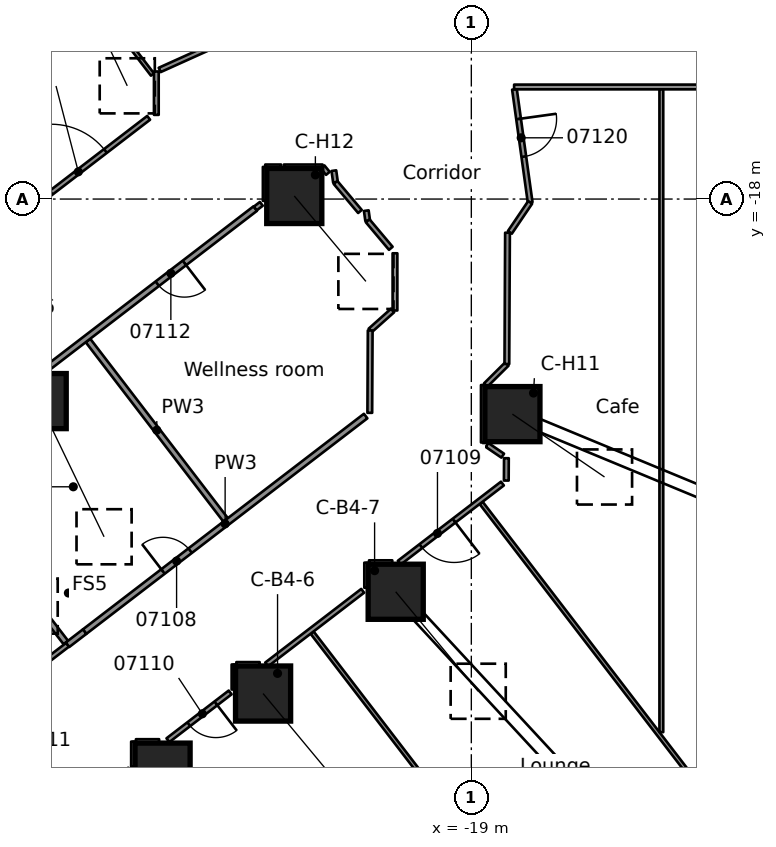
"""IFC4 building model, lengths in metres.
Left out: names, types, materials, properties, quantities, classifications, styles, units other than length and angle.
Written with IfcOpenShell. Run it as: python <this file> out.ifc"""

import sys

from ifc_helpers import new_model, si_unit, direction, frame, frame_2d, origin, origin_2d, place, context, subcontext, project, spatial, rectangle, extrude, element, fill, save


model = new_model("IFC4")
c1 = context("Model", 3, precision=1e-05, world=origin(), true_north=direction((0.0, 1.0)))
c2 = subcontext(c1, "Body", "Model", "MODEL_VIEW")
j1 = project(units=[si_unit("LENGTHUNIT", "METRE"), si_unit("PLANEANGLEUNIT", "RADIAN")], contexts=[c1])
p1 = place(None, origin())
s1 = spatial("IfcSite", under=j1, at=p1, CompositionType="ELEMENT")
p2 = place(p1, origin())
s2 = spatial("IfcBuilding", under=s1, at=p2, CompositionType="ELEMENT")
p3 = place(p2, frame((0.0, 0.0, 33.3)))
s3 = spatial("IfcBuildingStorey", under=s2, at=p3, CompositionType="ELEMENT", Elevation=33.3)
p4 = place(p3, frame((-33.03, -25.345, 0.601), z_axis=(0.484075605361, -0.672785526742, 0.559491236125), x_axis=(0.811723079597, 0.584042500208, 0.0)))
e1 = element("IfcColumn", 1, at=p4, inside=s3, PredefinedType="COLUMN", context=c2, shape_type="SweptSolid", body=[
    extrude(rectangle(XDim=1.45, YDim=1.45, at=origin_2d()), origin(), (0.0, 0.0, 1.0), 5.001),
])
p5 = place(p3, frame((-30.385, -23.316, 0.591), z_axis=(0.353875242444, -0.734106635021, 0.579534089768), x_axis=(0.90080181457, 0.434230458244, 0.0)))
e2 = element("IfcColumn", 2, at=p5, inside=s3, PredefinedType="COLUMN", context=c2, shape_type="SweptSolid", body=[
    extrude(rectangle(XDim=1.45, YDim=1.45, at=origin_2d()), origin(), (0.0, 0.0, 1.0), 4.863),
])
p6 = place(p3, frame((-27.125, -33.04, 0.603), z_axis=(0.626915434331, -0.545922874152, 0.555828439066), x_axis=(0.656712169931, 0.754141316906, 0.0)))
e3 = element("IfcColumn", 3, at=p6, inside=s3, PredefinedType="COLUMN", context=c2, shape_type="SweptSolid", body=[
    extrude(rectangle(XDim=1.45, YDim=1.45, at=origin_2d()), origin(), (0.0, 0.0, 1.0), 5.028),
])
p7 = place(p3, frame((-24.48, -31.011, 0.583), z_axis=(0.514125147633, -0.618557618127, 0.594190041678), x_axis=(0.769039707257, 0.639201008026, 0.0)))
e4 = element("IfcColumn", 4, at=p7, inside=s3, PredefinedType="COLUMN", context=c2, shape_type="SweptSolid", body=[
    extrude(rectangle(XDim=1.45, YDim=1.45, at=origin_2d()), origin(), (0.0, 0.0, 1.0), 4.769),
])
p8 = place(p3, frame((-20.99, -28.333, 0.552), z_axis=(0.48599783766, -0.586072291187, 0.648325050644), x_axis=(0.769766563569, 0.638325495035, 0.0)))
e5 = element("IfcColumn", 5, at=p8, inside=s3, PredefinedType="COLUMN", context=c2, shape_type="SweptSolid", body=[
    extrude(rectangle(XDim=1.45, YDim=1.45, at=origin_2d()), origin(), (0.0, 0.0, 1.0), 4.467),
])
p9 = place(p3, frame((-17.919, -23.659, 0.508), z_axis=(0.579239562537, -0.395280825563, 0.712905742812), x_axis=(0.563672389997, 0.825998448397, 0.0)))
e6 = element("IfcColumn", 6, at=p9, inside=s3, PredefinedType="COLUMN", context=c2, shape_type="SweptSolid", body=[
    extrude(rectangle(XDim=1.45, YDim=1.45, at=origin_2d()), origin(), (0.0, 0.0, 1.0), 4.185),
])
p10 = place(p3, frame((-23.659, -17.919, 0.508), z_axis=(0.450505155937, -0.537268679687, 0.713012952408), x_axis=(0.766266875891, 0.642522431446, 0.0)))
e7 = element("IfcColumn", 7, at=p10, inside=s3, PredefinedType="COLUMN", context=c2, shape_type="SweptSolid", body=[
    extrude(rectangle(XDim=1.45, YDim=1.45, at=origin_2d()), origin(), (0.0, 0.0, 1.0), 4.184),
])
p11 = place(p3, frame((-29.4, -12.178, 0.53), z_axis=(0.312560635038, -0.660215598589, 0.682950373603), x_axis=(0.903829481424, 0.427892823623, 0.0)))
e8 = element("IfcColumn", 8, at=p11, inside=s3, PredefinedType="COLUMN", context=c2, shape_type="SweptSolid", body=[
    extrude(rectangle(XDim=1.45, YDim=1.45, at=origin_2d()), origin(), (0.0, 0.0, 1.0), 4.306),
])
p12 = place(p3, frame((-22.617, -17.253, 0.0), z_axis=(0.0, 0.0, 1.0), x_axis=(0.13769629663, -0.990474497347, 0.0)))
e9 = element("IfcWall", 9, at=p12, inside=s3, PredefinedType="PARTITIONING", context=c2, shape_type="SweptSolid", body=[
    extrude(rectangle(XDim=0.312, YDim=0.125, at=frame_2d((0.156, 0.0))), origin(), (0.0, 0.0, 1.0), 3.56),
])
p13 = place(p3, frame((-21.764, -18.305, 0.0), z_axis=(0.0, 0.0, 1.0), x_axis=(0.136729319326, -0.990608445975, 0.0)))
e10 = element("IfcWall", 10, at=p13, inside=s3, PredefinedType="PARTITIONING", context=c2, shape_type="SweptSolid", body=[
    extrude(rectangle(XDim=0.27, YDim=0.125, at=frame_2d((0.135, 0.0))), origin(), (0.0, 0.0, 1.0), 3.56),
])
p14 = place(p3, frame((-17.865, -15.113, 0.0), z_axis=(0.0, 0.0, 1.0), x_axis=(0.137539572685, -0.990496272555, 0.0)))
e11 = element("IfcWall", 11, at=p14, inside=s3, PredefinedType="PARTITIONING", context=c2, shape_type="SweptSolid", body=[
    extrude(rectangle(XDim=3.003, YDim=0.125, at=frame_2d((1.502, 0.0))), origin(), (0.0, 0.0, 1.0), 3.56),
])
p15 = place(p14, frame((0.788, 0.0, 0.0)))
e12 = element("IfcOpeningElement", 12, at=p15, cuts=e11, PredefinedType="OPENING", context=c2, shape_type="SweptSolid", body=[
    extrude(rectangle(XDim=1.0, YDim=2.1, at=frame_2d((0.5, 1.05))), frame((0.0, 0.073, 0.0), z_axis=(0.0, -1.0, 0.0), x_axis=(1.0, 0.0, 0.0)), (0.0, 0.0, 1.0), 0.145),
])
p16 = place(p3, frame((-33.482, -24.701, 0.0), z_axis=(0.0, 0.0, 1.0), x_axis=(0.608730316576, -0.793377212731, 0.0)))
e13 = element("IfcWall", 13, at=p16, inside=s3, PredefinedType="PARTITIONING", context=c2, shape_type="SweptSolid", body=[
    extrude(rectangle(XDim=6.261, YDim=0.15, at=frame_2d((3.13, 0.0))), origin(), (0.0, 0.0, 1.0), 3.56),
])
p17 = place(p3, frame((-27.599, -32.368, 0.0), z_axis=(0.0, 0.0, 1.0), x_axis=(0.608787633684, -0.793333232049, 0.0)))
e14 = element("IfcWall", 14, at=p17, inside=s3, PredefinedType="PARTITIONING", context=c2, shape_type="SweptSolid", body=[
    extrude(rectangle(XDim=15.6, YDim=0.1, at=frame_2d((7.8, 0.0))), origin(), (0.0, 0.0, 1.0), 3.56),
])
p18 = place(p3, frame((-29.087, -21.722, 0.0), z_axis=(0.0, 0.0, 1.0), x_axis=(0.608744291625, -0.793366489975, 0.0)))
e15 = element("IfcWall", 15, at=p18, inside=s3, PredefinedType="PARTITIONING", context=c2, shape_type="SweptSolid", body=[
    extrude(rectangle(XDim=5.948, YDim=0.15, at=frame_2d((2.974, 0.0))), origin(), (0.0, 0.0, 1.0), 3.56),
])
p19 = place(p3, frame((-23.19, -29.408, 0.0), z_axis=(0.0, 0.0, 1.0), x_axis=(0.608771263508, -0.793345793917, 0.0)))
e16 = element("IfcWall", 16, at=p19, inside=s3, PredefinedType="PARTITIONING", context=c2, shape_type="SweptSolid", body=[
    extrude(rectangle(XDim=14.738, YDim=0.1, at=frame_2d((7.369, 0.0))), origin(), (0.0, 0.0, 1.0), 3.56),
])
p20 = place(p3, frame((-36.678, -2.619, 0.0), z_axis=(0.0, 0.0, 1.0), x_axis=(0.608725798764, -0.793380679069, 0.0)))
e17 = element("IfcWall", 17, at=p20, inside=s3, PredefinedType="PARTITIONING", context=c2, shape_type="SweptSolid", body=[
    extrude(rectangle(XDim=15.256, YDim=0.1, at=frame_2d((7.628, 0.0))), origin(), (0.0, 0.0, 1.0), 3.56),
])
p21 = place(p3, frame((-18.742, -25.995, 0.0), z_axis=(0.0, 0.0, 1.0), x_axis=(0.608756044644, -0.79335747183, 0.0)))
e18 = element("IfcWall", 18, at=p21, inside=s3, PredefinedType="PARTITIONING", context=c2, shape_type="SweptSolid", body=[
    extrude(rectangle(XDim=14.181, YDim=0.1, at=frame_2d((7.091, 0.0))), origin(), (0.0, 0.0, 1.0), 3.56),
])
p22 = place(p3, frame((-22.915, -17.154, 0.0), z_axis=(0.0, 0.0, 1.0), x_axis=(0.636251036078, -0.771482092527, 0.0)))
e19 = element("IfcWall", 19, at=p22, inside=s3, PredefinedType="PARTITIONING", context=c2, shape_type="SweptSolid", body=[
    extrude(rectangle(XDim=0.22, YDim=0.125, at=frame_2d((0.11, 0.0))), origin(), (0.0, 0.0, 1.0), 3.56),
])
p23 = place(p3, frame((-22.574, -17.563, 0.0), z_axis=(0.0, 0.0, 1.0), x_axis=(0.644000213242, -0.765025310264, 0.0)))
e20 = element("IfcWall", 20, at=p23, inside=s3, PredefinedType="PARTITIONING", context=c2, shape_type="SweptSolid", body=[
    extrude(rectangle(XDim=0.999, YDim=0.125, at=frame_2d((0.499, 0.0))), origin(), (0.0, 0.0, 1.0), 3.56),
])
p24 = place(p3, frame((-21.727, -18.573, 0.0), z_axis=(0.0, 0.0, 1.0), x_axis=(0.643761629109, -0.765226087432, 0.0)))
e21 = element("IfcWall", 21, at=p24, inside=s3, PredefinedType="PARTITIONING", context=c2, shape_type="SweptSolid", body=[
    extrude(rectangle(XDim=0.945, YDim=0.125, at=frame_2d((0.472, 0.0))), origin(), (0.0, 0.0, 1.0), 3.56),
])
p25 = place(p3, frame((-18.586, -24.471, 0.0), z_axis=(0.0, 0.0, 1.0), x_axis=(0.8260511917, -0.563595092855, 0.0)))
e22 = element("IfcWall", 22, at=p25, inside=s3, PredefinedType="PARTITIONING", context=c2, shape_type="SweptSolid", body=[
    extrude(rectangle(XDim=0.499, YDim=0.125, at=frame_2d((0.249, 0.0))), origin(), (0.0, 0.0, 1.0), 3.56),
])
p26 = place(p3, frame((-27.826, -32.275, 0.0), z_axis=(0.0, 0.0, 1.0), x_axis=(1.0, 0.0, 0.0)))
e23 = element("IfcWall", 23, at=p26, inside=s3, PredefinedType="PARTITIONING", context=c2, shape_type="SweptSolid", body=[
    extrude(rectangle(XDim=0.611, YDim=0.125, at=frame_2d((0.305, 0.0))), origin(), (0.0, 0.0, 1.0), 3.56),
])
p27 = place(p3, frame((-25.183, -30.246, 0.0), z_axis=(0.0, 0.0, 1.0), x_axis=(1.0, 0.0, 0.0)))
e24 = element("IfcWall", 24, at=p27, inside=s3, PredefinedType="PARTITIONING", context=c2, shape_type="SweptSolid", body=[
    extrude(rectangle(XDim=0.613, YDim=0.125, at=frame_2d((0.307, 0.0))), origin(), (0.0, 0.0, 1.0), 3.56),
])
p28 = place(p3, frame((-21.692, -27.568, 0.0), z_axis=(0.0, 0.0, 1.0), x_axis=(1.0, 0.0, 0.0)))
e25 = element("IfcWall", 25, at=p28, inside=s3, PredefinedType="PARTITIONING", context=c2, shape_type="SweptSolid", body=[
    extrude(rectangle(XDim=0.612, YDim=0.125, at=frame_2d((0.306, 0.0))), origin(), (0.0, 0.0, 1.0), 3.56),
])
p29 = place(p3, frame((-18.622, -22.894, 0.0), z_axis=(0.0, 0.0, 1.0), x_axis=(0.70974550127, 0.704458177202, 0.0)))
e26 = element("IfcWall", 26, at=p29, inside=s3, PredefinedType="PARTITIONING", context=c2, shape_type="SweptSolid", body=[
    extrude(rectangle(XDim=0.785, YDim=0.125, at=frame_2d((0.393, 0.0))), origin(), (0.0, 0.0, 1.0), 3.56),
])
p30 = place(p3, frame((-21.661, -21.457, 0.0), z_axis=(0.0, 0.0, 1.0), x_axis=(0.746332821082, 0.665572926264, 0.0)))
e27 = element("IfcWall", 27, at=p30, inside=s3, PredefinedType="PARTITIONING", context=c2, shape_type="SweptSolid", body=[
    extrude(rectangle(XDim=0.789, YDim=0.125, at=frame_2d((0.395, 0.0))), origin(), (0.0, 0.0, 1.0), 3.56),
])
p31 = place(p3, frame((-24.423, -17.154, 0.0), z_axis=(0.0, 0.0, 1.0), x_axis=(1.0, 0.0, 0.0)))
e28 = element("IfcWall", 28, at=p31, inside=s3, PredefinedType="PARTITIONING", context=c2, shape_type="SweptSolid", body=[
    extrude(rectangle(XDim=0.417, YDim=0.125, at=frame_2d((0.208, 0.0))), origin(), (0.0, 0.0, 1.0), 3.56),
])
p32 = place(p3, frame((-23.934, -17.154, 0.0), z_axis=(0.0, 0.0, 1.0), x_axis=(1.0, 0.0, 0.0)))
e29 = element("IfcWall", 29, at=p32, inside=s3, PredefinedType="PARTITIONING", context=c2, shape_type="SweptSolid", body=[
    extrude(rectangle(XDim=1.019, YDim=0.125, at=frame_2d((0.51, 0.0))), origin(), (0.0, 0.0, 1.0), 3.56),
])
p33 = place(p3, frame((-17.874, -15.051, 0.0), z_axis=(0.0, 0.0, 1.0), x_axis=(1.0, 0.0, 0.0)))
e30 = element("IfcWall", 30, at=p33, inside=s3, PredefinedType="PARTITIONING", context=c2, shape_type="SweptSolid", body=[
    extrude(rectangle(XDim=6.883, YDim=0.125, at=frame_2d((3.441, 0.0))), origin(), (0.0, 0.0, 1.0), 3.56),
])
p34 = place(p3, frame((-17.986, -18.877, 0.0), z_axis=(0.0, 0.0, 1.0), x_axis=(0.560598849045, 0.828087513763, 0.0)))
e31 = element("IfcWall", 31, at=p34, inside=s3, PredefinedType="PARTITIONING", context=c2, shape_type="SweptSolid", body=[
    extrude(rectangle(XDim=0.953, YDim=0.125, at=frame_2d((0.477, 0.0))), origin(), (0.0, 0.0, 1.0), 3.56),
])
p35 = place(p3, frame((-27.201, -14.603, 0.0), z_axis=(0.0, 0.0, 1.0), x_axis=(0.911401146152, 0.411519077071, 0.0)))
e32 = element("IfcWall", 32, at=p35, inside=s3, PredefinedType="PARTITIONING", context=c2, shape_type="SweptSolid", body=[
    extrude(rectangle(XDim=1.354, YDim=0.125, at=frame_2d((0.677, 0.0))), origin(), (0.0, 0.0, 1.0), 3.56),
])
p36 = place(p3, frame((-25.346, -30.982, 0.0), z_axis=(0.0, 0.0, 1.0), x_axis=(-0.79329604463, -0.608836090893, 0.0)))
e33 = element("IfcWall", 33, at=p36, inside=s3, PredefinedType="PARTITIONING", context=c2, shape_type="SweptSolid", body=[
    extrude(rectangle(XDim=2.065, YDim=0.125, at=frame_2d((1.032, 0.0))), origin(), (0.0, 0.0, 1.0), 3.56),
])
p37 = place(p36, frame((0.473, 0.0, 0.0)))
e34 = element("IfcOpeningElement", 34, at=p37, cuts=e33, PredefinedType="OPENING", context=c2, shape_type="SweptSolid", body=[
    extrude(rectangle(XDim=0.9, YDim=2.1, at=frame_2d((0.45, 1.05))), frame((0.0, 0.073, 0.0), z_axis=(0.0, -1.0, 0.0), x_axis=(1.0, 0.0, 0.0)), (0.0, 0.0, 1.0), 0.145),
])
p38 = place(p3, frame((-24.386, -30.246, 0.0), z_axis=(0.0, 0.0, 1.0), x_axis=(0.793523683955, 0.60853936849, 0.0)))
e35 = element("IfcWall", 35, at=p38, inside=s3, PredefinedType="PARTITIONING", context=c2, shape_type="SweptSolid", body=[
    extrude(rectangle(XDim=3.185, YDim=0.125, at=frame_2d((1.592, 0.0))), origin(), (0.0, 0.0, 1.0), 3.56),
])
p39 = place(p3, frame((-18.182, -25.486, 0.0), z_axis=(0.0, 0.0, 1.0), x_axis=(-0.793435168534, -0.608654773523, 0.0)))
e36 = element("IfcWall", 36, at=p39, inside=s3, PredefinedType="PARTITIONING", context=c2, shape_type="SweptSolid", body=[
    extrude(rectangle(XDim=3.421, YDim=0.125, at=frame_2d((1.71, 0.0))), origin(), (0.0, 0.0, 1.0), 3.56),
])
p40 = place(p39, frame((1.604, 0.0, 0.0)))
e37 = element("IfcOpeningElement", 37, at=p40, cuts=e36, PredefinedType="OPENING", context=c2, shape_type="SweptSolid", body=[
    extrude(rectangle(XDim=1.1, YDim=2.1, at=frame_2d((0.55, 1.05))), frame((0.0, 0.073, 0.0), z_axis=(0.0, -1.0, 0.0), x_axis=(1.0, 0.0, 0.0)), (0.0, 0.0, 1.0), 0.145),
])
p41 = place(p3, frame((-36.283, -34.836, 0.0), z_axis=(0.0, 0.0, 1.0), x_axis=(0.793406369961, 0.608692313165, 0.0)))
e38 = element("IfcWall", 38, at=p41, inside=s3, PredefinedType="PARTITIONING", context=c2, shape_type="SweptSolid", body=[
    extrude(rectangle(XDim=8.392, YDim=0.125, at=frame_2d((4.196, 0.0))), origin(), (0.0, 0.0, 1.0), 3.56),
])
p42 = place(p41, frame((3.473, 0.0, 0.0)))
e39 = element("IfcOpeningElement", 39, at=p42, cuts=e38, PredefinedType="OPENING", context=c2, shape_type="SweptSolid", body=[
    extrude(rectangle(XDim=1.1, YDim=2.1, at=frame_2d((0.55, 1.05))), frame((0.0, 0.073, 0.0), z_axis=(0.0, -1.0, 0.0), x_axis=(1.0, 0.0, 0.0)), (0.0, 0.0, 1.0), 0.145),
])
p43 = place(p3, frame((-29.176, -29.382, 0.0), z_axis=(0.0, 0.0, 1.0), x_axis=(0.793471421385, 0.608607511821, 0.0)))
e40 = element("IfcWall", 40, at=p43, inside=s3, PredefinedType="PARTITIONING", context=c2, shape_type="SweptSolid", body=[
    extrude(rectangle(XDim=9.32, YDim=0.15, at=frame_2d((4.66, 0.0))), origin(), (0.0, 0.0, 1.0), 3.56),
])
p44 = place(p43, frame((2.6, 0.0, 0.0)))
e41 = element("IfcOpeningElement", 41, at=p44, cuts=e40, PredefinedType="OPENING", context=c2, shape_type="SweptSolid", body=[
    extrude(rectangle(XDim=0.9, YDim=2.1, at=frame_2d((0.45, 1.05))), frame((0.0, 0.085, 0.0), z_axis=(0.0, -1.0, 0.0), x_axis=(1.0, 0.0, 0.0)), (0.0, 0.0, 1.0), 0.17),
])
p45 = place(p3, frame((-29.625, -29.727, 0.0), z_axis=(0.0, 0.0, 1.0), x_axis=(0.792960485916, 0.609273065035, 0.0)))
e42 = element("IfcWall", 42, at=p45, inside=s3, PredefinedType="PARTITIONING", context=c2, shape_type="SweptSolid", body=[
    extrude(rectangle(XDim=0.566, YDim=0.15, at=frame_2d((0.283, 0.0))), origin(), (0.0, 0.0, 1.0), 3.56),
])
p46 = place(p3, frame((-24.685, -18.25, 0.0), z_axis=(0.0, 0.0, 1.0), x_axis=(-0.793443961698, -0.608643310687, 0.0)))
e43 = element("IfcWall", 43, at=p46, inside=s3, PredefinedType="PARTITIONING", context=c2, shape_type="SweptSolid", body=[
    extrude(rectangle(XDim=7.067, YDim=0.15, at=frame_2d((3.533, 0.0))), origin(), (0.0, 0.0, 1.0), 3.56),
])
p47 = place(p46, frame((2.35, 0.0, 0.0)))
e44 = element("IfcOpeningElement", 44, at=p47, cuts=e43, PredefinedType="OPENING", context=c2, shape_type="SweptSolid", body=[
    extrude(rectangle(XDim=0.9, YDim=2.1, at=frame_2d((0.45, 1.05))), frame((0.0, 0.085, 0.0), z_axis=(0.0, -1.0, 0.0), x_axis=(1.0, 0.0, 0.0)), (0.0, 0.0, 1.0), 0.17),
])
p48 = place(p3, frame((-35.081, -21.687, 0.0), z_axis=(0.0, 0.0, 1.0), x_axis=(0.793358624224, 0.608754542792, 0.0)))
e45 = element("IfcWall", 45, at=p48, inside=s3, PredefinedType="PARTITIONING", context=c2, shape_type="SweptSolid", body=[
    extrude(rectangle(XDim=9.567, YDim=0.125, at=frame_2d((4.784, 0.0))), origin(), (0.0, 0.0, 1.0), 3.56),
])
p49 = place(p48, frame((6.334, 0.0, 0.0)))
e46 = element("IfcOpeningElement", 46, at=p49, cuts=e45, PredefinedType="OPENING", context=c2, shape_type="SweptSolid", body=[
    extrude(rectangle(XDim=1.8, YDim=2.1, at=frame_2d((0.9, 1.05))), frame((0.0, 0.073, 0.0), z_axis=(0.0, -1.0, 0.0), x_axis=(1.0, 0.0, 0.0)), (0.0, 0.0, 1.0), 0.145),
])
p50 = place(p48, frame((1.85, 0.0, 0.0)))
e47 = element("IfcOpeningElement", 47, at=p50, cuts=e45, PredefinedType="OPENING", context=c2, shape_type="SweptSolid", body=[
    extrude(rectangle(XDim=1.1, YDim=2.1, at=frame_2d((0.55, 1.05))), frame((0.0, 0.073, 0.0), z_axis=(0.0, -1.0, 0.0), x_axis=(1.0, 0.0, 0.0)), (0.0, 0.0, 1.0), 0.145),
])
p51 = place(p3, frame((-24.686, -18.249, 0.0), z_axis=(0.0, 0.0, 1.0), x_axis=(0.792983350532, 0.609243305896, 0.0)))
e48 = element("IfcWall", 48, at=p51, inside=s3, PredefinedType="PARTITIONING", context=c2, shape_type="SweptSolid", body=[
    extrude(rectangle(XDim=0.202, YDim=0.125, at=frame_2d((0.101, 0.0))), origin(), (0.0, 0.0, 1.0), 3.56),
])
p52 = place(p3, frame((-18.08, -25.407, 0.0), z_axis=(0.0, 0.0, 1.0), x_axis=(0.005398592424, 0.999985427494, 0.0)))
e49 = element("IfcWall", 49, at=p52, inside=s3, PredefinedType="PARTITIONING", context=c2, shape_type="SweptSolid", body=[
    extrude(rectangle(XDim=0.588, YDim=0.125, at=frame_2d((0.294, 0.0))), origin(), (0.0, 0.0, 1.0), 3.56),
])
p53 = place(p3, frame((-18.065, -22.341, 0.0), z_axis=(0.0, 0.0, 1.0), x_axis=(0.004875578002, 0.999988114299, 0.0)))
e50 = element("IfcWall", 50, at=p53, inside=s3, PredefinedType="PARTITIONING", context=c2, shape_type="SweptSolid", body=[
    extrude(rectangle(XDim=3.455, YDim=0.125, at=frame_2d((1.728, 0.0))), origin(), (0.0, 0.0, 1.0), 3.56),
])
p54 = place(p3, frame((-21.672, -23.625, 0.0), z_axis=(0.0, 0.0, 1.0), x_axis=(0.005180110678, 0.999986583137, 0.0)))
e51 = element("IfcWall", 51, at=p54, inside=s3, PredefinedType="PARTITIONING", context=c2, shape_type="SweptSolid", body=[
    extrude(rectangle(XDim=2.168, YDim=0.125, at=frame_2d((1.084, 0.0))), origin(), (0.0, 0.0, 1.0), 3.56),
])
p55 = place(p3, frame((-14.0, -32.027, 0.0), z_axis=(0.0, 0.0, 1.0), x_axis=(0.0, 1.0, 0.0)))
e52 = element("IfcWall", 52, at=p55, inside=s3, PredefinedType="PARTITIONING", context=c2, shape_type="SweptSolid", body=[
    extrude(rectangle(XDim=16.913, YDim=0.1, at=frame_2d((8.457, 0.0))), origin(), (0.0, 0.0, 1.0), 3.56),
])
p56 = place(p3, frame((-18.684, -24.405, 0.0), z_axis=(0.0, 0.0, 1.0), x_axis=(0.0, 1.0, 0.0)))
e53 = element("IfcWall", 53, at=p56, inside=s3, PredefinedType="PARTITIONING", context=c2, shape_type="SweptSolid", body=[
    extrude(rectangle(XDim=1.511, YDim=0.125, at=frame_2d((0.755, 0.0))), origin(), (0.0, 0.0, 1.0), 3.56),
])
p57 = place(p3, frame((-21.009, -20.932, 0.0), z_axis=(0.0, 0.0, 1.0), x_axis=(0.0, 1.0, 0.0)))
e54 = element("IfcWall", 54, at=p57, inside=s3, PredefinedType="PARTITIONING", context=c2, shape_type="SweptSolid", body=[
    extrude(rectangle(XDim=1.505, YDim=0.125, at=frame_2d((0.752, 0.0))), origin(), (0.0, 0.0, 1.0), 3.56),
])
p58 = place(p3, frame((-21.754, -28.227, 0.0), z_axis=(0.0, 0.0, 1.0), x_axis=(0.0, 1.0, 0.0)))
e55 = element("IfcWall", 55, at=p58, inside=s3, PredefinedType="PARTITIONING", context=c2, shape_type="SweptSolid", body=[
    extrude(rectangle(XDim=0.659, YDim=0.125, at=frame_2d((0.33, 0.0))), origin(), (0.0, 0.0, 1.0), 3.56),
])
p59 = place(p3, frame((-24.423, -18.048, 0.0), z_axis=(0.0, 0.0, 1.0), x_axis=(0.0, 1.0, 0.0)))
e56 = element("IfcWall", 56, at=p59, inside=s3, PredefinedType="PARTITIONING", context=c2, shape_type="SweptSolid", body=[
    extrude(rectangle(XDim=0.894, YDim=0.125, at=frame_2d((0.447, 0.0))), origin(), (0.0, 0.0, 1.0), 3.56),
])
p60 = place(p3, frame((-25.245, -30.905, 0.0), z_axis=(0.0, 0.0, 1.0), x_axis=(0.0, 1.0, 0.0)))
e57 = element("IfcWall", 57, at=p60, inside=s3, PredefinedType="PARTITIONING", context=c2, shape_type="SweptSolid", body=[
    extrude(rectangle(XDim=0.659, YDim=0.125, at=frame_2d((0.33, 0.0))), origin(), (0.0, 0.0, 1.0), 3.56),
])
p61 = place(p3, frame((-27.289, -15.785, 0.0), z_axis=(0.0, 0.0, 1.0), x_axis=(0.0, 1.0, 0.0)))
e58 = element("IfcWall", 58, at=p61, inside=s3, PredefinedType="PARTITIONING", context=c2, shape_type="SweptSolid", body=[
    extrude(rectangle(XDim=1.142, YDim=0.125, at=frame_2d((0.571, 0.0))), origin(), (0.0, 0.0, 1.0), 3.56),
])
p62 = place(p3, frame((-27.889, -32.934, 0.0), z_axis=(0.0, 0.0, 1.0), x_axis=(0.0, 1.0, 0.0)))
e59 = element("IfcWall", 59, at=p62, inside=s3, PredefinedType="PARTITIONING", context=c2, shape_type="SweptSolid", body=[
    extrude(rectangle(XDim=0.659, YDim=0.125, at=frame_2d((0.33, 0.0))), origin(), (0.0, 0.0, 1.0), 3.56),
])
p63 = place(p44, origin())
e60 = element("IfcDoor", 60, at=p63, inside=s3, OperationType="SINGLE_SWING_LEFT", PredefinedType="DOOR", context=c2, shape_type="SweptSolid", body=[
    extrude(rectangle(XDim=0.9, YDim=2.1, at=frame_2d((0.45, 1.05))), frame((0.0, 0.025, 0.0), z_axis=(0.0, -1.0, 0.0), x_axis=(1.0, 0.0, 0.0)), (0.0, 0.0, 1.0), 0.05),
])
fill(e41, e60)
p64 = place(p40, origin())
e61 = element("IfcDoor", 61, at=p64, inside=s3, OperationType="SINGLE_SWING_RIGHT", PredefinedType="DOOR", context=c2, shape_type="SweptSolid", body=[
    extrude(rectangle(XDim=1.1, YDim=2.1, at=frame_2d((0.55, 1.05))), frame((0.0, 0.025, 0.0), z_axis=(0.0, -1.0, 0.0), x_axis=(1.0, 0.0, 0.0)), (0.0, 0.0, 1.0), 0.05),
])
fill(e37, e61)
p65 = place(p37, origin())
e62 = element("IfcDoor", 62, at=p65, inside=s3, OperationType="SINGLE_SWING_LEFT", PredefinedType="DOOR", context=c2, shape_type="SweptSolid", body=[
    extrude(rectangle(XDim=0.9, YDim=2.1, at=frame_2d((0.45, 1.05))), frame((0.0, 0.025, 0.0), z_axis=(0.0, -1.0, 0.0), x_axis=(1.0, 0.0, 0.0)), (0.0, 0.0, 1.0), 0.05),
])
fill(e34, e62)
p66 = place(p47, origin())
e63 = element("IfcDoor", 63, at=p66, inside=s3, OperationType="SINGLE_SWING_LEFT", PredefinedType="DOOR", context=c2, shape_type="SweptSolid", body=[
    extrude(rectangle(XDim=0.9, YDim=2.1, at=frame_2d((0.45, 1.05))), frame((0.0, 0.025, 0.0), z_axis=(0.0, -1.0, 0.0), x_axis=(1.0, 0.0, 0.0)), (0.0, 0.0, 1.0), 0.05),
])
fill(e44, e63)
p67 = place(p49, origin())
e64 = element("IfcDoor", 64, at=p67, inside=s3, OperationType="DOUBLE_DOOR_SINGLE_SWING", PredefinedType="DOOR", context=c2, shape_type="SweptSolid", body=[
    extrude(rectangle(XDim=1.8, YDim=2.1, at=frame_2d((0.9, 1.05))), frame((0.0, 0.025, 0.0), z_axis=(0.0, -1.0, 0.0), x_axis=(1.0, 0.0, 0.0)), (0.0, 0.0, 1.0), 0.05),
])
fill(e46, e64)
p68 = place(p15, origin())
e65 = element("IfcDoor", 65, at=p68, inside=s3, OperationType="SINGLE_SWING_LEFT", PredefinedType="DOOR", context=c2, shape_type="SweptSolid", body=[
    extrude(rectangle(XDim=1.0, YDim=2.1, at=frame_2d((0.5, 1.05))), frame((0.0, 0.025, 0.0), z_axis=(0.0, -1.0, 0.0), x_axis=(1.0, 0.0, 0.0)), (0.0, 0.0, 1.0), 0.05),
])
fill(e12, e65)
save(model, sys.argv[1])
